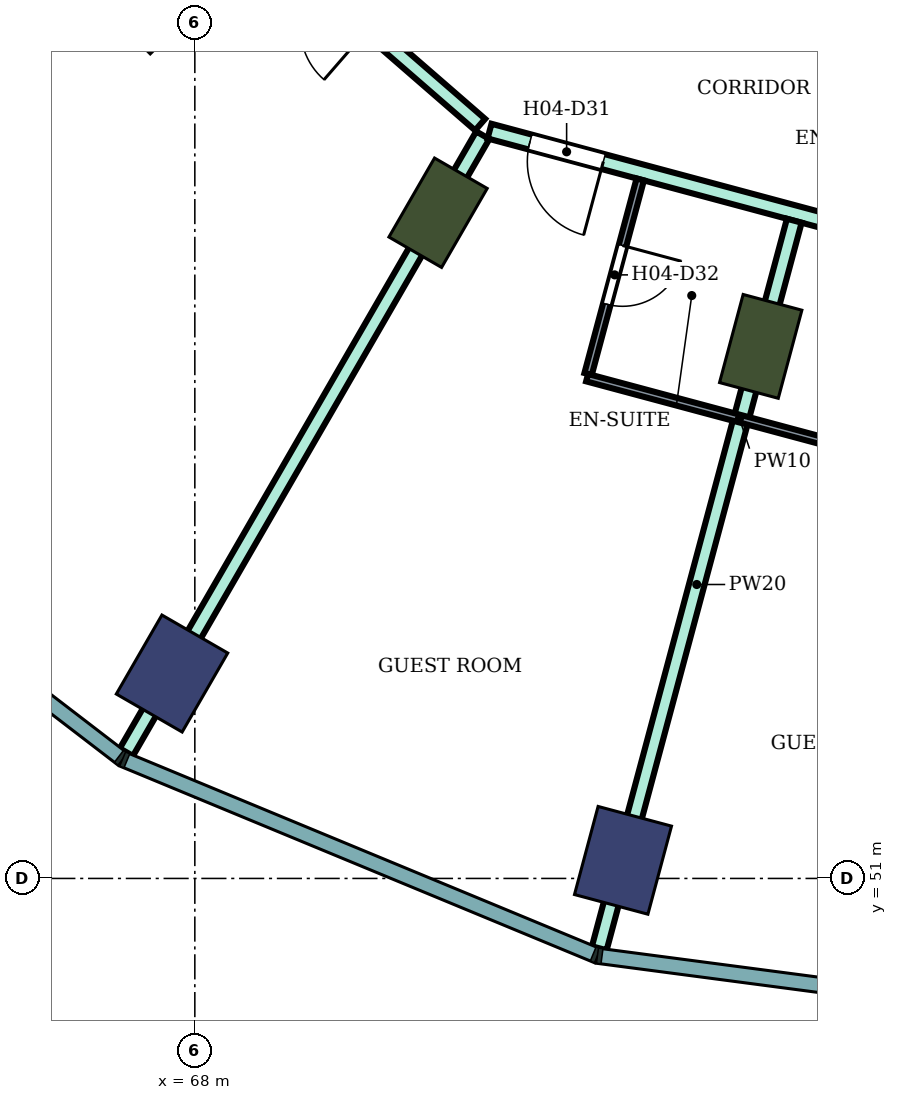
"""IFC4 building model, lengths in metres.
Left out: names, types, materials, properties, quantities, classifications, styles, units other than length and angle.
Written with IfcOpenShell. Run it as: python <this file> out.ifc"""

import sys

from ifc_helpers import new_model, si_unit, direction, frame, frame_2d, origin, origin_2d, place, context, subcontext, project, spatial, rectangle, extrude, element, fill, save


model = new_model("IFC4")
c1 = context("Model", 3, precision=1e-05, world=origin(), true_north=direction((0.0, 1.0)))
c2 = subcontext(c1, "Body", "Model", "MODEL_VIEW")
j1 = project(units=[si_unit("LENGTHUNIT", "METRE"), si_unit("PLANEANGLEUNIT", "RADIAN")], contexts=[c1])
p1 = place(None, origin())
s1 = spatial("IfcSite", under=j1, at=p1, CompositionType="ELEMENT")
p2 = place(p1, origin())
s2 = spatial("IfcBuilding", under=s1, at=p2, CompositionType="ELEMENT")
p3 = place(p2, frame((0.0, 0.0, 70.6)))
s3 = spatial("IfcBuildingStorey", under=s2, at=p3, CompositionType="ELEMENT", Elevation=70.6)
for number, where, z_axis, x_axis in (
    (1, (67.7, 53.696, 0.0), (0.0, 0.0, 1.0), (-0.5, -0.866, 0.0)),
    (2, (73.633, 51.238, 0.0), (0.0, 0.0, 1.0), (-0.259, -0.966, 0.0)),
):
    element("IfcColumn", number, at=place(p3, frame(where, z_axis=z_axis, x_axis=x_axis)), inside=s3, PredefinedType="COLUMN", context=c2, shape_type="SweptSolid", body=[
        extrude(rectangle(XDim=1.2, YDim=1.0, at=origin_2d()), origin(), (0.0, 0.0, 1.0), 3.8),
    ])
for number, where, z_axis, x_axis in (
    (3, (67.555, 62.555, 0.0), (0.0, 0.0, 1.0), (-0.707, -0.707, 0.0)),
    (4, (71.2, 59.758, 0.0), (0.0, 0.0, 1.0), (-0.5, -0.866, 0.0)),
    (5, (75.445, 58.0, 0.0), (0.0, 0.0, 1.0), (-0.259, -0.966, 0.0)),
):
    element("IfcColumn", number, at=place(p3, frame(where, z_axis=z_axis, x_axis=x_axis)), inside=s3, PredefinedType="COLUMN", context=c2, shape_type="SweptSolid", body=[
        extrude(rectangle(XDim=1.2, YDim=0.8, at=origin_2d()), origin(), (0.0, 0.0, 1.0), 3.8),
    ])
p4 = place(p3, frame((66.924, 65.111, 0.0), z_axis=(0.0, 0.0, 1.0), x_axis=(0.755023669255, -0.655697536113, 0.0)))
e6 = element("IfcWall", 6, at=p4, inside=s3, PredefinedType="PARTITIONING", context=c2, shape_type="SweptSolid", body=[
    extrude(rectangle(XDim=6.396, YDim=0.2, at=frame_2d((3.198, 0.0))), origin(), (0.0, 0.0, 1.0), 3.35),
])
p5 = place(p4, frame((2.658, 0.0, 0.0)))
e7 = element("IfcOpeningElement", 7, at=p5, cuts=e6, PredefinedType="OPENING", context=c2, shape_type="SweptSolid", body=[
    extrude(rectangle(XDim=1.8, YDim=2.1, at=frame_2d((0.9, 1.05))), frame((0.0, 0.11, 0.0), z_axis=(0.0, -1.0, 0.0), x_axis=(1.0, 0.0, 0.0)), (0.0, 0.0, 1.0), 0.22),
])
p6 = place(p3, frame((67.099, 52.661, 0.0), z_axis=(0.0, 0.0, 1.0), x_axis=(0.500234203776, 0.86589014394, 0.0)))
e8 = element("IfcWall", 8, at=p6, inside=s3, PredefinedType="PARTITIONING", context=c2, shape_type="SweptSolid", body=[
    extrude(rectangle(XDim=9.374, YDim=0.2, at=frame_2d((4.687, 0.0))), origin(), (0.0, 0.0, 1.0), 3.35),
])
p7 = place(p3, frame((71.877, 60.832, 0.0), z_axis=(0.0, 0.0, 1.0), x_axis=(0.965852509869, -0.259092510851, 0.0)))
e9 = element("IfcWall", 9, at=p7, inside=s3, PredefinedType="PARTITIONING", context=c2, shape_type="SweptSolid", body=[
    extrude(rectangle(XDim=8.32, YDim=0.2, at=frame_2d((4.16, 0.0))), origin(), (0.0, 0.0, 1.0), 3.35),
])
p8 = place(p7, frame((6.86, 0.0, 0.0)))
e10 = element("IfcOpeningElement", 10, at=p8, cuts=e9, PredefinedType="OPENING", context=c2, shape_type="SweptSolid", body=[
    extrude(rectangle(XDim=1.0, YDim=2.1, at=frame_2d((0.5, 1.05))), frame((0.0, 0.11, 0.0), z_axis=(0.0, -1.0, 0.0), x_axis=(1.0, 0.0, 0.0)), (0.0, 0.0, 1.0), 0.22),
])
p9 = place(p7, frame((0.55, 0.0, 0.0)))
e11 = element("IfcOpeningElement", 11, at=p9, cuts=e9, PredefinedType="OPENING", context=c2, shape_type="SweptSolid", body=[
    extrude(rectangle(XDim=1.0, YDim=2.1, at=frame_2d((0.5, 1.05))), frame((0.0, 0.11, 0.0), z_axis=(0.0, -1.0, 0.0), x_axis=(1.0, 0.0, 0.0)), (0.0, 0.0, 1.0), 0.22),
])
p10 = place(p3, frame((73.297, 63.143, 0.0), z_axis=(0.0, 0.0, 1.0), x_axis=(0.965859030528, -0.25906820173, 0.0)))
e12 = element("IfcWall", 12, at=p10, inside=s3, PredefinedType="PARTITIONING", context=c2, shape_type="SweptSolid", body=[
    extrude(rectangle(XDim=6.81, YDim=0.2, at=frame_2d((3.405, 0.0))), origin(), (0.0, 0.0, 1.0), 3.35),
])
p11 = place(p10, frame((5.39, 0.0, 0.0)))
e13 = element("IfcOpeningElement", 13, at=p11, cuts=e12, PredefinedType="OPENING", context=c2, shape_type="SweptSolid", body=[
    extrude(rectangle(XDim=1.0, YDim=2.1, at=frame_2d((0.5, 1.05))), frame((0.0, 0.11, 0.0), z_axis=(0.0, -1.0, 0.0), x_axis=(1.0, 0.0, 0.0)), (0.0, 0.0, 1.0), 0.22),
])
p12 = place(p3, frame((73.321, 50.081, 0.0), z_axis=(0.0, 0.0, 1.0), x_axis=(0.258889198551, 0.965907025999, 0.0)))
e14 = element("IfcWall", 14, at=p12, inside=s3, PredefinedType="PARTITIONING", context=c2, shape_type="SweptSolid", body=[
    extrude(rectangle(XDim=9.909, YDim=0.2, at=frame_2d((4.955, 0.0))), origin(), (0.0, 0.0, 1.0), 3.35),
])
p13 = place(p3, frame((73.174, 57.636, 0.0), z_axis=(0.0, 0.0, 1.0), x_axis=(0.258952498977, 0.96589005755, 0.0)))
e15 = element("IfcWall", 15, at=p13, inside=s3, PredefinedType="PARTITIONING", context=c2, shape_type="SweptSolid", body=[
    extrude(rectangle(XDim=2.65, YDim=0.1, at=frame_2d((1.325, 0.0))), origin(), (0.0, 0.0, 1.0), 3.35),
])
p14 = place(p13, frame((0.95, 0.0, 0.0)))
e16 = element("IfcOpeningElement", 16, at=p14, cuts=e15, PredefinedType="OPENING", context=c2, shape_type="SweptSolid", body=[
    extrude(rectangle(XDim=0.8, YDim=2.1, at=frame_2d((0.4, 1.05))), frame((0.0, 0.06, 0.0), z_axis=(0.0, -1.0, 0.0), x_axis=(1.0, 0.0, 0.0)), (0.0, 0.0, 1.0), 0.12),
])
p15 = place(p3, frame((73.161, 57.588, 0.0), z_axis=(0.0, 0.0, 1.0), x_axis=(0.965858994467, -0.259068336173, 0.0)))
e17 = element("IfcWall", 17, at=p15, inside=s3, PredefinedType="PARTITIONING", context=c2, shape_type="SweptSolid", body=[
    extrude(rectangle(XDim=4.15, YDim=0.1, at=frame_2d((2.075, 0.0))), origin(), (0.0, 0.0, 1.0), 3.35),
])
p16 = place(p9, frame((1.0, 0.0, 0.0), z_axis=(0.0, 0.0, 1.0), x_axis=(-1.0, 0.0, 0.0)))
e18 = element("IfcDoor", 18, at=p16, inside=s3, OperationType="SINGLE_SWING_LEFT", PredefinedType="DOOR", context=c2, shape_type="SweptSolid", body=[
    extrude(rectangle(XDim=1.0, YDim=2.1, at=frame_2d((0.5, 1.05))), frame((0.0, 0.025, 0.0), z_axis=(0.0, -1.0, 0.0), x_axis=(1.0, 0.0, 0.0)), (0.0, 0.0, 1.0), 0.05),
])
fill(e11, e18)
p17 = place(p14, frame((0.8, 0.0, 0.0), z_axis=(0.0, 0.0, 1.0), x_axis=(-1.0, 0.0, 0.0)))
e19 = element("IfcDoor", 19, at=p17, inside=s3, OperationType="SINGLE_SWING_LEFT", PredefinedType="DOOR", context=c2, shape_type="SweptSolid", body=[
    extrude(rectangle(XDim=0.8, YDim=2.1, at=frame_2d((0.4, 1.05))), frame((0.0, 0.025, 0.0), z_axis=(0.0, -1.0, 0.0), x_axis=(1.0, 0.0, 0.0)), (0.0, 0.0, 1.0), 0.05),
])
fill(e16, e19)
save(model, sys.argv[1])
